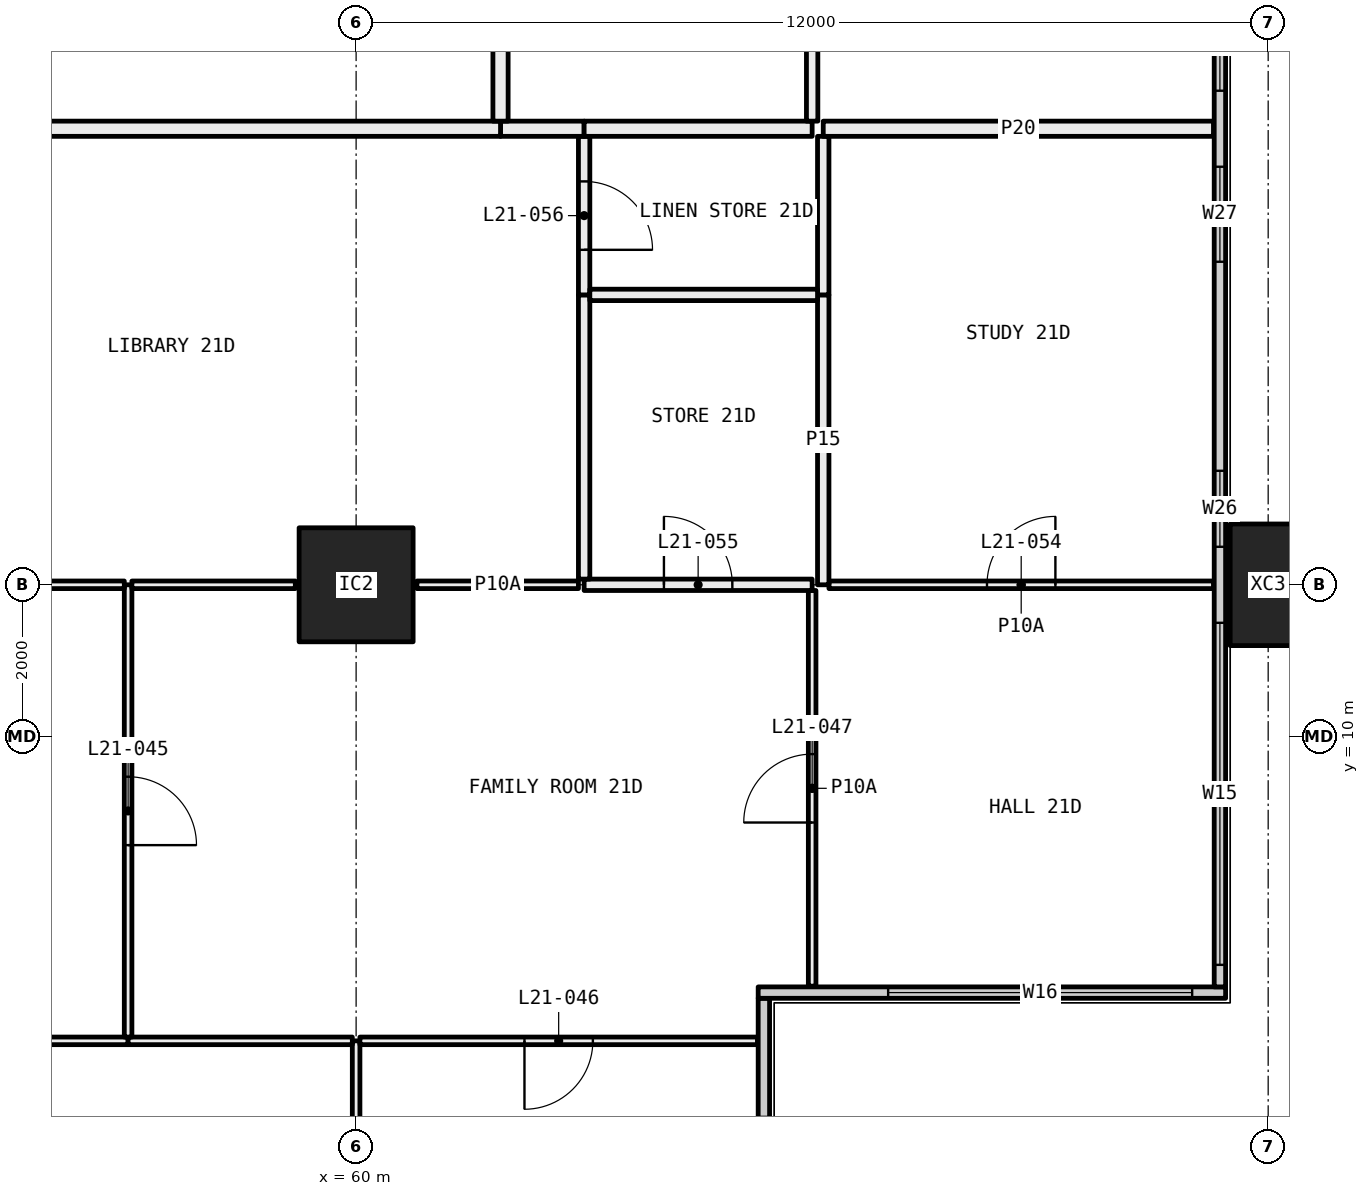
"""IFC4 building model, lengths in metres.
Left out: names, types, materials, properties, quantities, classifications, styles, units other than length and angle.
Written with IfcOpenShell. Run it as: python <this file> out.ifc"""

import sys

from ifc_helpers import new_model, si_unit, direction, frame, frame_2d, origin, origin_2d, place, context, subcontext, project, spatial, rectangle, hollow_rectangle, extrude, element, fill, save


model = new_model("IFC4")
c1 = context("Model", 3, precision=1e-05, world=origin(), true_north=direction((0.0, 1.0)))
c2 = subcontext(c1, "Body", "Model", "MODEL_VIEW")
j1 = project(units=[si_unit("LENGTHUNIT", "METRE"), si_unit("PLANEANGLEUNIT", "RADIAN")], contexts=[c1])
p1 = place(None, origin())
s1 = spatial("IfcSite", under=j1, at=p1, CompositionType="ELEMENT")
p2 = place(p1, origin())
s2 = spatial("IfcBuilding", under=s1, at=p2, CompositionType="ELEMENT")
p3 = place(p2, frame((0.0, 0.0, 85.2)))
s3 = spatial("IfcBuildingStorey", under=s2, at=p3, CompositionType="ELEMENT", Elevation=85.2)
p4 = place(p3, frame((60.0, 12.0, 0.0), z_axis=(0.0, 0.0, 1.0), x_axis=(1.0, 0.0, 0.0)))
e1 = element("IfcColumn", 1, at=p4, inside=s3, PredefinedType="COLUMN", context=c2, shape_type="SweptSolid", body=[
    extrude(hollow_rectangle(XDim=1.5, YDim=1.5, WallThickness=0.065, at=origin_2d()), origin(), (0.0, 0.0, 1.0), 3.05),
])
p5 = place(p3, frame((72.0, 12.0, -0.4), z_axis=(0.0, 0.0, 1.0), x_axis=(0.0, 1.0, 0.0)))
e2 = element("IfcColumn", 2, at=p5, inside=s3, PredefinedType="COLUMN", context=c2, shape_type="SweptSolid", body=[
    extrude(hollow_rectangle(XDim=1.6, YDim=1.0, WallThickness=0.065, at=origin_2d()), origin(), (0.0, 0.0, 1.0), 3.45),
])
p6 = place(p3, frame((65.365, 0.71, 0.0), z_axis=(0.0, 0.0, 1.0), x_axis=(0.0, 1.0, 0.0)))
e3 = element("IfcWall", 3, at=p6, inside=s3, PredefinedType="ELEMENTEDWALL", context=c2, shape_type="SweptSolid", body=[
    extrude(rectangle(XDim=5.85, YDim=0.15, at=frame_2d((2.925, 0.0))), origin(), (0.0, 0.0, 1.0), 3.05),
])
p7 = place(p6, frame((0.29, 0.0, 0.45)))
e4 = element("IfcOpeningElement", 4, at=p7, cuts=e3, PredefinedType="OPENING", context=c2, shape_type="SweptSolid", body=[
    extrude(rectangle(XDim=4.0, YDim=2.55, at=frame_2d((2.0, 1.275))), frame((0.0, 0.085, 0.0), z_axis=(0.0, -1.0, 0.0), x_axis=(1.0, 0.0, 0.0)), (0.0, 0.0, 1.0), 0.17),
])
p8 = place(p3, frame((65.29, 6.635, 0.0), z_axis=(0.0, 0.0, 1.0), x_axis=(1.0, 0.0, 0.0)))
e5 = element("IfcWall", 5, at=p8, inside=s3, PredefinedType="ELEMENTEDWALL", context=c2, shape_type="SweptSolid", body=[
    extrude(rectangle(XDim=6.15, YDim=0.15, at=frame_2d((3.075, 0.0))), origin(), (0.0, 0.0, 1.0), 3.05),
])
p9 = place(p8, frame((1.71, 0.0, 0.45)))
e6 = element("IfcOpeningElement", 6, at=p9, cuts=e5, PredefinedType="OPENING", context=c2, shape_type="SweptSolid", body=[
    extrude(rectangle(XDim=4.0, YDim=2.55, at=frame_2d((2.0, 1.275))), frame((0.0, 0.085, 0.0), z_axis=(0.0, -1.0, 0.0), x_axis=(1.0, 0.0, 0.0)), (0.0, 0.0, 1.0), 0.17),
])
p10 = place(p3, frame((71.365, 6.71, 0.0), z_axis=(0.0, 0.0, 1.0), x_axis=(0.0, 1.0, 0.0)))
e7 = element("IfcWall", 7, at=p10, inside=s3, PredefinedType="ELEMENTEDWALL", context=c2, shape_type="SweptSolid", body=[
    extrude(rectangle(XDim=34.58, YDim=0.15, at=frame_2d((17.29, 0.0))), origin(), (0.0, 0.0, 1.0), 3.05),
])
p11 = place(p10, frame((0.29, 0.0, 0.45)))
e8 = element("IfcOpeningElement", 8, at=p11, cuts=e7, PredefinedType="OPENING", context=c2, shape_type="SweptSolid", body=[
    extrude(rectangle(XDim=4.5, YDim=2.55, at=frame_2d((2.25, 1.275))), frame((0.0, 0.085, 0.0), z_axis=(0.0, -1.0, 0.0), x_axis=(1.0, 0.0, 0.0)), (0.0, 0.0, 1.0), 0.17),
])
p12 = place(p10, frame((5.79, 0.0, 0.45)))
e9 = element("IfcOpeningElement", 9, at=p12, cuts=e7, PredefinedType="OPENING", context=c2, shape_type="SweptSolid", body=[
    extrude(rectangle(XDim=1.0, YDim=2.55, at=frame_2d((0.5, 1.275))), frame((0.0, 0.085, 0.0), z_axis=(0.0, -1.0, 0.0), x_axis=(1.0, 0.0, 0.0)), (0.0, 0.0, 1.0), 0.17),
])
p13 = place(p10, frame((9.54, 0.0, 0.45)))
e10 = element("IfcOpeningElement", 10, at=p13, cuts=e7, PredefinedType="OPENING", context=c2, shape_type="SweptSolid", body=[
    extrude(rectangle(XDim=1.25, YDim=2.55, at=frame_2d((0.625, 1.275))), frame((0.0, 0.085, 0.0), z_axis=(0.0, -1.0, 0.0), x_axis=(1.0, 0.0, 0.0)), (0.0, 0.0, 1.0), 0.17),
])
p14 = place(p10, frame((11.79, 0.0, 0.45)))
e11 = element("IfcOpeningElement", 11, at=p14, cuts=e7, PredefinedType="OPENING", context=c2, shape_type="SweptSolid", body=[
    extrude(rectangle(XDim=1.25, YDim=2.55, at=frame_2d((0.625, 1.275))), frame((0.0, 0.085, 0.0), z_axis=(0.0, -1.0, 0.0), x_axis=(1.0, 0.0, 0.0)), (0.0, 0.0, 1.0), 0.17),
])
p15 = place(p10, frame((15.79, 0.0, 0.45)))
e12 = element("IfcOpeningElement", 12, at=p15, cuts=e7, PredefinedType="OPENING", context=c2, shape_type="SweptSolid", body=[
    extrude(rectangle(XDim=1.0, YDim=2.55, at=frame_2d((0.5, 1.275))), frame((0.0, 0.085, 0.0), z_axis=(0.0, -1.0, 0.0), x_axis=(1.0, 0.0, 0.0)), (0.0, 0.0, 1.0), 0.17),
])
p16 = place(p10, frame((17.79, 0.0, 0.45)))
e13 = element("IfcOpeningElement", 13, at=p16, cuts=e7, PredefinedType="OPENING", context=c2, shape_type="SweptSolid", body=[
    extrude(rectangle(XDim=1.0, YDim=2.55, at=frame_2d((0.5, 1.275))), frame((0.0, 0.085, 0.0), z_axis=(0.0, -1.0, 0.0), x_axis=(1.0, 0.0, 0.0)), (0.0, 0.0, 1.0), 0.17),
])
p17 = place(p10, frame((21.54, 0.0, 0.45)))
e14 = element("IfcOpeningElement", 14, at=p17, cuts=e7, PredefinedType="OPENING", context=c2, shape_type="SweptSolid", body=[
    extrude(rectangle(XDim=1.25, YDim=2.55, at=frame_2d((0.625, 1.275))), frame((0.0, 0.085, 0.0), z_axis=(0.0, -1.0, 0.0), x_axis=(1.0, 0.0, 0.0)), (0.0, 0.0, 1.0), 0.17),
])
p18 = place(p10, frame((23.79, 0.0, 0.45)))
e15 = element("IfcOpeningElement", 15, at=p18, cuts=e7, PredefinedType="OPENING", context=c2, shape_type="SweptSolid", body=[
    extrude(rectangle(XDim=1.25, YDim=2.55, at=frame_2d((0.625, 1.275))), frame((0.0, 0.085, 0.0), z_axis=(0.0, -1.0, 0.0), x_axis=(1.0, 0.0, 0.0)), (0.0, 0.0, 1.0), 0.17),
])
p19 = place(p10, frame((27.79, 0.0, 0.45)))
e16 = element("IfcOpeningElement", 16, at=p19, cuts=e7, PredefinedType="OPENING", context=c2, shape_type="SweptSolid", body=[
    extrude(rectangle(XDim=1.0, YDim=2.55, at=frame_2d((0.5, 1.275))), frame((0.0, 0.085, 0.0), z_axis=(0.0, -1.0, 0.0), x_axis=(1.0, 0.0, 0.0)), (0.0, 0.0, 1.0), 0.17),
])
p20 = place(p10, frame((29.79, 0.0, 0.45)))
e17 = element("IfcOpeningElement", 17, at=p20, cuts=e7, PredefinedType="OPENING", context=c2, shape_type="SweptSolid", body=[
    extrude(rectangle(XDim=4.5, YDim=2.55, at=frame_2d((2.25, 1.275))), frame((0.0, 0.085, 0.0), z_axis=(0.0, -1.0, 0.0), x_axis=(1.0, 0.0, 0.0)), (0.0, 0.0, 1.0), 0.17),
])
p21 = place(p3, frame((60.0, 0.72, 0.0), z_axis=(0.0, 0.0, 1.0), x_axis=(0.0, 1.0, 0.0)))
e18 = element("IfcWall", 18, at=p21, inside=s3, PredefinedType="PARTITIONING", context=c2, shape_type="SweptSolid", body=[
    extrude(rectangle(XDim=5.28, YDim=0.1, at=frame_2d((2.64, 0.0))), origin(), (0.0, 0.0, 1.0), 2.45),
])
p22 = place(p3, frame((57.0, 6.0, 0.0), z_axis=(0.0, 0.0, 1.0), x_axis=(-1.0, 0.0, 0.0)))
e19 = element("IfcWall", 19, at=p22, inside=s3, PredefinedType="PARTITIONING", context=c2, shape_type="SweptSolid", body=[
    extrude(rectangle(XDim=2.95, YDim=0.1, at=frame_2d((1.475, 0.0))), origin(), (0.0, 0.0, 1.0), 3.05),
])
p23 = place(p3, frame((59.95, 6.0, 0.0), z_axis=(0.0, 0.0, 1.0), x_axis=(-1.0, 0.0, 0.0)))
e20 = element("IfcWall", 20, at=p23, inside=s3, PredefinedType="PARTITIONING", context=c2, shape_type="SweptSolid", body=[
    extrude(rectangle(XDim=2.95, YDim=0.1, at=frame_2d((1.475, 0.0))), origin(), (0.0, 0.0, 1.0), 2.45),
])
p24 = place(p3, frame((65.28, 6.0, 0.0), z_axis=(0.0, 0.0, 1.0), x_axis=(-1.0, 0.0, 0.0)))
e21 = element("IfcWall", 21, at=p24, inside=s3, PredefinedType="PARTITIONING", context=c2, shape_type="SweptSolid", body=[
    extrude(rectangle(XDim=5.23, YDim=0.1, at=frame_2d((2.615, 0.0))), origin(), (0.0, 0.0, 1.0), 2.45),
])
p25 = place(p24, frame((2.165, 0.0, 0.0)))
e22 = element("IfcOpeningElement", 22, at=p25, cuts=e21, PredefinedType="OPENING", context=c2, shape_type="SweptSolid", body=[
    extrude(rectangle(XDim=0.9, YDim=2.1, at=frame_2d((0.45, 1.05))), frame((0.0, 0.06, 0.0), z_axis=(0.0, -1.0, 0.0), x_axis=(1.0, 0.0, 0.0)), (0.0, 0.0, 1.0), 0.12),
])
p26 = place(p3, frame((57.0, 6.05, 0.0), z_axis=(0.0, 0.0, 1.0), x_axis=(0.0, 1.0, 0.0)))
e23 = element("IfcWall", 23, at=p26, inside=s3, PredefinedType="PARTITIONING", context=c2, shape_type="SweptSolid", body=[
    extrude(rectangle(XDim=5.95, YDim=0.1, at=frame_2d((2.975, 0.0))), origin(), (0.0, 0.0, 1.0), 2.45),
])
p27 = place(p26, frame((2.525, 0.0, 0.0)))
e24 = element("IfcOpeningElement", 24, at=p27, cuts=e23, PredefinedType="OPENING", context=c2, shape_type="SweptSolid", body=[
    extrude(rectangle(XDim=0.9, YDim=2.1, at=frame_2d((0.45, 1.05))), frame((0.0, 0.06, 0.0), z_axis=(0.0, -1.0, 0.0), x_axis=(1.0, 0.0, 0.0)), (0.0, 0.0, 1.0), 0.12),
])
p28 = place(p3, frame((56.95, 12.0, 0.0), z_axis=(0.0, 0.0, 1.0), x_axis=(-1.0, 0.0, 0.0)))
e25 = element("IfcWall", 25, at=p28, inside=s3, PredefinedType="PARTITIONING", context=c2, shape_type="SweptSolid", body=[
    extrude(rectangle(XDim=2.95, YDim=0.1, at=frame_2d((1.475, 0.0))), origin(), (0.0, 0.0, 1.0), 2.45),
])
p29 = place(p3, frame((66.0, 6.72, 0.0), z_axis=(0.0, 0.0, 1.0), x_axis=(0.0, 1.0, 0.0)))
e26 = element("IfcWall", 26, at=p29, inside=s3, PredefinedType="PARTITIONING", context=c2, shape_type="SweptSolid", body=[
    extrude(rectangle(XDim=5.205, YDim=0.1, at=frame_2d((2.603, 0.0))), origin(), (0.0, 0.0, 1.0), 2.45),
])
p30 = place(p29, frame((2.153, 0.0, 0.0)))
e27 = element("IfcOpeningElement", 27, at=p30, cuts=e26, PredefinedType="OPENING", context=c2, shape_type="SweptSolid", body=[
    extrude(rectangle(XDim=0.9, YDim=2.1, at=frame_2d((0.45, 1.05))), frame((0.0, 0.06, 0.0), z_axis=(0.0, -1.0, 0.0), x_axis=(1.0, 0.0, 0.0)), (0.0, 0.0, 1.0), 0.12),
])
p31 = place(p3, frame((59.2, 12.0, 0.0), z_axis=(0.0, 0.0, 1.0), x_axis=(-1.0, 0.0, 0.0)))
e28 = element("IfcWall", 28, at=p31, inside=s3, PredefinedType="PARTITIONING", context=c2, shape_type="SweptSolid", body=[
    extrude(rectangle(XDim=2.15, YDim=0.1, at=frame_2d((1.075, 0.0))), origin(), (0.0, 0.0, 1.0), 2.45),
])
p32 = place(p3, frame((62.925, 12.0, 0.0), z_axis=(0.0, 0.0, 1.0), x_axis=(-1.0, 0.0, 0.0)))
e29 = element("IfcWall", 29, at=p32, inside=s3, PredefinedType="PARTITIONING", context=c2, shape_type="SweptSolid", body=[
    extrude(rectangle(XDim=2.125, YDim=0.1, at=frame_2d((1.062, 0.0))), origin(), (0.0, 0.0, 1.0), 2.45),
])
p33 = place(p3, frame((66.0, 12.0, 0.0), z_axis=(0.0, 0.0, 1.0), x_axis=(-1.0, 0.0, 0.0)))
e30 = element("IfcWall", 30, at=p33, inside=s3, PredefinedType="PARTITIONING", context=c2, shape_type="SweptSolid", body=[
    extrude(rectangle(XDim=3.0, YDim=0.15, at=frame_2d((1.5, 0.0))), origin(), (0.0, 0.0, 1.0), 2.45),
])
p34 = place(p33, frame((1.05, 0.0, 0.0)))
e31 = element("IfcOpeningElement", 31, at=p34, cuts=e30, PredefinedType="OPENING", context=c2, shape_type="SweptSolid", body=[
    extrude(rectangle(XDim=0.9, YDim=2.1, at=frame_2d((0.45, 1.05))), frame((0.0, 0.085, 0.0), z_axis=(0.0, -1.0, 0.0), x_axis=(1.0, 0.0, 0.0)), (0.0, 0.0, 1.0), 0.17),
])
p35 = place(p3, frame((71.28, 12.0, 0.0), z_axis=(0.0, 0.0, 1.0), x_axis=(-1.0, 0.0, 0.0)))
e32 = element("IfcWall", 32, at=p35, inside=s3, PredefinedType="PARTITIONING", context=c2, shape_type="SweptSolid", body=[
    extrude(rectangle(XDim=5.059, YDim=0.1, at=frame_2d((2.53, 0.0))), origin(), (0.0, 0.0, 1.0), 2.45),
])
p36 = place(p35, frame((2.08, 0.0, 0.0)))
e33 = element("IfcOpeningElement", 33, at=p36, cuts=e32, PredefinedType="OPENING", context=c2, shape_type="SweptSolid", body=[
    extrude(rectangle(XDim=0.9, YDim=2.1, at=frame_2d((0.45, 1.05))), frame((0.0, 0.06, 0.0), z_axis=(0.0, -1.0, 0.0), x_axis=(1.0, 0.0, 0.0)), (0.0, 0.0, 1.0), 0.12),
])
p37 = place(p3, frame((63.0, 12.075, 0.0), z_axis=(0.0, 0.0, 1.0), x_axis=(0.0, 1.0, 0.0)))
e34 = element("IfcWall", 34, at=p37, inside=s3, PredefinedType="PARTITIONING", context=c2, shape_type="SweptSolid", body=[
    extrude(rectangle(XDim=3.739, YDim=0.15, at=frame_2d((1.87, 0.0))), origin(), (0.0, 0.0, 1.0), 2.45),
])
p38 = place(p3, frame((63.0, 15.814, 0.0), z_axis=(0.0, 0.0, 1.0), x_axis=(0.0, 1.0, 0.0)))
e35 = element("IfcWall", 35, at=p38, inside=s3, PredefinedType="PARTITIONING", context=c2, shape_type="SweptSolid", body=[
    extrude(rectangle(XDim=2.086, YDim=0.15, at=frame_2d((1.043, 0.0))), origin(), (0.0, 0.0, 1.0), 3.05),
])
p39 = place(p38, frame((0.593, 0.0, 0.0)))
e36 = element("IfcOpeningElement", 36, at=p39, cuts=e35, PredefinedType="OPENING", context=c2, shape_type="SweptSolid", body=[
    extrude(rectangle(XDim=0.9, YDim=2.1, at=frame_2d((0.45, 1.05))), frame((0.0, 0.085, 0.0), z_axis=(0.0, -1.0, 0.0), x_axis=(1.0, 0.0, 0.0)), (0.0, 0.0, 1.0), 0.17),
])
p40 = place(p3, frame((63.0, 18.0, 0.0), z_axis=(0.0, 0.0, 1.0), x_axis=(-1.0, 0.0, 0.0)))
e37 = element("IfcWall", 37, at=p40, inside=s3, PredefinedType="PARTITIONING", context=c2, shape_type="SweptSolid", body=[
    extrude(rectangle(XDim=1.1, YDim=0.2, at=frame_2d((0.55, 0.0))), origin(), (0.0, 0.0, 1.0), 3.05),
])
p41 = place(p3, frame((61.9, 18.0, 0.0), z_axis=(0.0, 0.0, 1.0), x_axis=(-1.0, 0.0, 0.0)))
e38 = element("IfcWall", 38, at=p41, inside=s3, PredefinedType="PARTITIONING", context=c2, shape_type="SweptSolid", body=[
    extrude(rectangle(XDim=7.9, YDim=0.2, at=frame_2d((3.95, 0.0))), origin(), (0.0, 0.0, 1.0), 3.05),
])
p42 = place(p3, frame((66.146, 15.814, 0.0), z_axis=(0.0, 0.0, 1.0), x_axis=(0.0, -1.0, 0.0)))
e39 = element("IfcWall", 39, at=p42, inside=s3, PredefinedType="PARTITIONING", context=c2, shape_type="SweptSolid", body=[
    extrude(rectangle(XDim=3.814, YDim=0.15, at=frame_2d((1.907, 0.0))), origin(), (0.0, 0.0, 1.0), 2.45),
])
p43 = place(p3, frame((66.146, 17.9, 0.0), z_axis=(0.0, 0.0, 1.0), x_axis=(0.0, -1.0, 0.0)))
e40 = element("IfcWall", 40, at=p43, inside=s3, PredefinedType="PARTITIONING", context=c2, shape_type="SweptSolid", body=[
    extrude(rectangle(XDim=2.086, YDim=0.15, at=frame_2d((1.043, 0.0))), origin(), (0.0, 0.0, 1.0), 2.55),
])
p44 = place(p3, frame((71.28, 18.0, 0.0), z_axis=(0.0, 0.0, 1.0), x_axis=(-1.0, 0.0, 0.0)))
e41 = element("IfcWall", 41, at=p44, inside=s3, PredefinedType="PARTITIONING", context=c2, shape_type="SweptSolid", body=[
    extrude(rectangle(XDim=5.134, YDim=0.2, at=frame_2d((2.567, 0.0))), origin(), (0.0, 0.0, 1.0), 3.05),
])
p45 = place(p3, frame((66.071, 15.814, 0.0), z_axis=(0.0, 0.0, 1.0), x_axis=(-1.0, 0.0, 0.0)))
e42 = element("IfcWall", 42, at=p45, inside=s3, PredefinedType="PARTITIONING", context=c2, shape_type="SweptSolid", body=[
    extrude(rectangle(XDim=2.996, YDim=0.15, at=frame_2d((1.498, 0.0))), origin(), (0.0, 0.0, 1.0), 3.05),
])
p46 = place(p3, frame((66.0, 18.0, 0.0), z_axis=(0.0, 0.0, 1.0), x_axis=(-1.0, 0.0, 0.0)))
e43 = element("IfcWall", 43, at=p46, inside=s3, PredefinedType="PARTITIONING", context=c2, shape_type="SweptSolid", body=[
    extrude(rectangle(XDim=3.0, YDim=0.2, at=frame_2d((1.5, 0.0))), origin(), (0.0, 0.0, 1.0), 3.05),
])
p47 = place(p3, frame((66.0, 22.5, 0.0), z_axis=(0.0, 0.0, 1.0), x_axis=(0.0, -1.0, 0.0)))
e44 = element("IfcWall", 44, at=p47, inside=s3, PredefinedType="PARTITIONING", context=c2, shape_type="SweptSolid", body=[
    extrude(rectangle(XDim=4.4, YDim=0.15, at=frame_2d((2.2, 0.0))), origin(), (0.0, 0.0, 1.0), 3.05),
])
p48 = place(p47, frame((1.75, 0.0, 0.0)))
e45 = element("IfcOpeningElement", 45, at=p48, cuts=e44, PredefinedType="OPENING", context=c2, shape_type="SweptSolid", body=[
    extrude(rectangle(XDim=0.9, YDim=2.1, at=frame_2d((0.45, 1.05))), frame((0.0, 0.085, 0.0), z_axis=(0.0, -1.0, 0.0), x_axis=(1.0, 0.0, 0.0)), (0.0, 0.0, 1.0), 0.17),
])
p49 = place(p3, frame((61.9, 22.5, 0.0), z_axis=(0.0, 0.0, 1.0), x_axis=(0.0, -1.0, 0.0)))
e46 = element("IfcWall", 46, at=p49, inside=s3, PredefinedType="PARTITIONING", context=c2, shape_type="SweptSolid", body=[
    extrude(rectangle(XDim=4.4, YDim=0.2, at=frame_2d((2.2, 0.0))), origin(), (0.0, 0.0, 1.0), 3.05),
])
p50 = place(p9, origin())
e47 = element("IfcWindow", 47, at=p50, inside=s3, PartitioningType="SINGLE_PANEL", PredefinedType="WINDOW", context=c2, shape_type="SweptSolid", body=[
    extrude(rectangle(XDim=4.0, YDim=2.55, at=frame_2d((2.0, 1.275))), frame((0.0, 0.03, 0.0), z_axis=(0.0, -1.0, 0.0), x_axis=(1.0, 0.0, 0.0)), (0.0, 0.0, 1.0), 0.06),
])
fill(e6, e47)
p51 = place(p11, origin())
e48 = element("IfcWindow", 48, at=p51, inside=s3, PartitioningType="SINGLE_PANEL", PredefinedType="WINDOW", context=c2, shape_type="SweptSolid", body=[
    extrude(rectangle(XDim=4.5, YDim=2.55, at=frame_2d((2.25, 1.275))), frame((0.0, 0.03, 0.0), z_axis=(0.0, -1.0, 0.0), x_axis=(1.0, 0.0, 0.0)), (0.0, 0.0, 1.0), 0.06),
])
fill(e8, e48)
p52 = place(p12, origin())
e49 = element("IfcWindow", 49, at=p52, inside=s3, PartitioningType="SINGLE_PANEL", PredefinedType="WINDOW", context=c2, shape_type="SweptSolid", body=[
    extrude(rectangle(XDim=1.0, YDim=2.55, at=frame_2d((0.5, 1.275))), frame((0.0, 0.03, 0.0), z_axis=(0.0, -1.0, 0.0), x_axis=(1.0, 0.0, 0.0)), (0.0, 0.0, 1.0), 0.06),
])
fill(e9, e49)
p53 = place(p13, origin())
e50 = element("IfcWindow", 50, at=p53, inside=s3, PartitioningType="SINGLE_PANEL", PredefinedType="WINDOW", context=c2, shape_type="SweptSolid", body=[
    extrude(rectangle(XDim=1.25, YDim=2.55, at=frame_2d((0.625, 1.275))), frame((0.0, 0.03, 0.0), z_axis=(0.0, -1.0, 0.0), x_axis=(1.0, 0.0, 0.0)), (0.0, 0.0, 1.0), 0.06),
])
fill(e10, e50)
p54 = place(p14, origin())
e51 = element("IfcWindow", 51, at=p54, inside=s3, PartitioningType="SINGLE_PANEL", PredefinedType="WINDOW", context=c2, shape_type="SweptSolid", body=[
    extrude(rectangle(XDim=1.25, YDim=2.55, at=frame_2d((0.625, 1.275))), frame((0.0, 0.03, 0.0), z_axis=(0.0, -1.0, 0.0), x_axis=(1.0, 0.0, 0.0)), (0.0, 0.0, 1.0), 0.06),
])
fill(e11, e51)
p55 = place(p27, frame((0.9, 0.0, 0.0), x_axis=(-1.0, 0.0, 0.0)))
e52 = element("IfcDoor", 52, at=p55, inside=s3, OperationType="SINGLE_SWING_LEFT", PredefinedType="DOOR", context=c2, shape_type="SweptSolid", body=[
    extrude(rectangle(XDim=0.9, YDim=2.1, at=frame_2d((0.45, 1.05))), frame((0.0, 0.025, 0.0), z_axis=(0.0, -1.0, 0.0), x_axis=(1.0, 0.0, 0.0)), (0.0, 0.0, 1.0), 0.05),
])
fill(e24, e52)
p56 = place(p25, origin())
e53 = element("IfcDoor", 53, at=p56, inside=s3, OperationType="SINGLE_SWING_LEFT", PredefinedType="DOOR", context=c2, shape_type="SweptSolid", body=[
    extrude(rectangle(XDim=0.9, YDim=2.1, at=frame_2d((0.45, 1.05))), frame((0.0, 0.025, 0.0), z_axis=(0.0, -1.0, 0.0), x_axis=(1.0, 0.0, 0.0)), (0.0, 0.0, 1.0), 0.05),
])
fill(e22, e53)
p57 = place(p30, origin())
e54 = element("IfcDoor", 54, at=p57, inside=s3, OperationType="SINGLE_SWING_RIGHT", PredefinedType="DOOR", context=c2, shape_type="SweptSolid", body=[
    extrude(rectangle(XDim=0.9, YDim=2.1, at=frame_2d((0.45, 1.05))), frame((0.0, 0.025, 0.0), z_axis=(0.0, -1.0, 0.0), x_axis=(1.0, 0.0, 0.0)), (0.0, 0.0, 1.0), 0.05),
])
fill(e27, e54)
p58 = place(p36, frame((0.9, 0.0, 0.0), x_axis=(-1.0, 0.0, 0.0)))
e55 = element("IfcDoor", 55, at=p58, inside=s3, OperationType="SINGLE_SWING_LEFT", PredefinedType="DOOR", context=c2, shape_type="SweptSolid", body=[
    extrude(rectangle(XDim=0.9, YDim=2.1, at=frame_2d((0.45, 1.05))), frame((0.0, 0.025, 0.0), z_axis=(0.0, -1.0, 0.0), x_axis=(1.0, 0.0, 0.0)), (0.0, 0.0, 1.0), 0.05),
])
fill(e33, e55)
p59 = place(p34, frame((0.9, 0.0, 0.0), x_axis=(-1.0, 0.0, 0.0)))
e56 = element("IfcDoor", 56, at=p59, inside=s3, OperationType="SINGLE_SWING_RIGHT", PredefinedType="DOOR", context=c2, shape_type="SweptSolid", body=[
    extrude(rectangle(XDim=0.9, YDim=2.1, at=frame_2d((0.45, 1.05))), frame((0.0, 0.025, 0.0), z_axis=(0.0, -1.0, 0.0), x_axis=(1.0, 0.0, 0.0)), (0.0, 0.0, 1.0), 0.05),
])
fill(e31, e56)
p60 = place(p39, frame((0.9, 0.0, 0.0), x_axis=(-1.0, 0.0, 0.0)))
e57 = element("IfcDoor", 57, at=p60, inside=s3, OperationType="SINGLE_SWING_LEFT", PredefinedType="DOOR", context=c2, shape_type="SweptSolid", body=[
    extrude(rectangle(XDim=0.9, YDim=2.1, at=frame_2d((0.45, 1.05))), frame((0.0, 0.025, 0.0), z_axis=(0.0, -1.0, 0.0), x_axis=(1.0, 0.0, 0.0)), (0.0, 0.0, 1.0), 0.05),
])
fill(e36, e57)
save(model, sys.argv[1])
